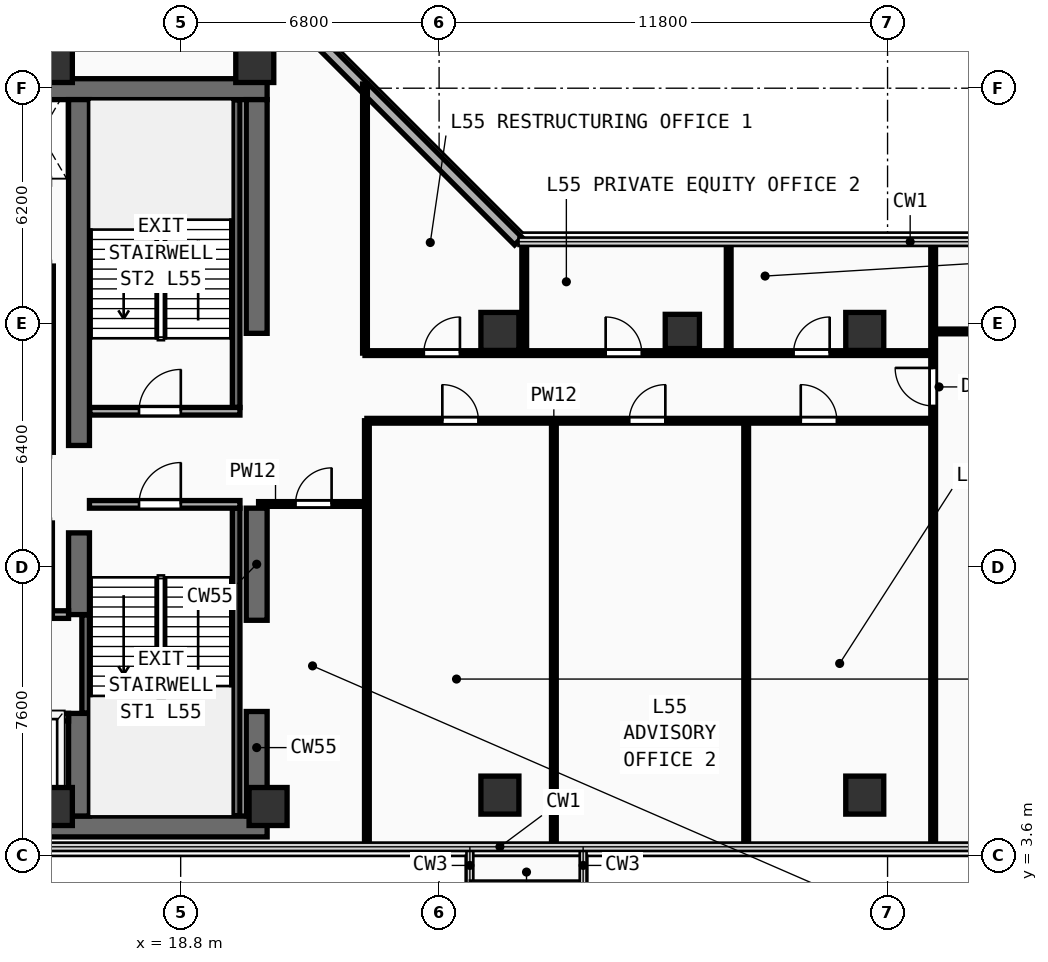
"""IFC4 building model, lengths in metres.
Left out: names, types, materials, properties, quantities, classifications, styles, units other than length and angle.
Written with IfcOpenShell. Run it as: python <this file> out.ifc"""

import sys

from ifc_helpers import new_model, si_unit, direction, frame, frame_2d, origin, origin_2d, place, context, subcontext, project, spatial, rectangle, extrude, element, fill, save


model = new_model("IFC4")
c1 = context("Model", 3, precision=1e-05, world=origin(), true_north=direction((0.0, 1.0)))
c2 = subcontext(c1, "Body", "Model", "MODEL_VIEW")
j1 = project(units=[si_unit("LENGTHUNIT", "METRE"), si_unit("PLANEANGLEUNIT", "RADIAN")], contexts=[c1])
p1 = place(None, origin())
s1 = spatial("IfcSite", under=j1, at=p1, CompositionType="ELEMENT")
p2 = place(p1, origin())
s2 = spatial("IfcBuilding", under=s1, at=p2, CompositionType="ELEMENT")
p3 = place(p2, frame((0.0, 0.0, 215.9)))
s3 = spatial("IfcBuildingStorey", under=s2, at=p3, CompositionType="ELEMENT", Elevation=215.9)
for number, where, z_axis, x_axis in (
    (1, (7.175, 4.375, 0.0), (0.0, 0.0, 1.0), (1.0, 0.0, 0.0)),
    (2, (7.175, 23.775, 0.0), (0.0, 0.0, 1.0), (1.0, 0.0, 0.0)),
):
    element("IfcWall", number, at=place(p3, frame(where, z_axis=z_axis, x_axis=x_axis)), inside=s3, PredefinedType="SHEAR", context=c2, shape_type="SweptSolid", body=[
        extrude(rectangle(XDim=13.9, YDim=0.55, at=frame_2d((6.95, 0.0))), origin(), (0.0, 0.0, 1.0), 3.56),
    ])
p4 = place(p3, frame((20.8, 4.65, 0.0), z_axis=(0.0, 0.0, 1.0), x_axis=(0.0, 1.0, 0.0)))
e3 = element("IfcWall", 3, at=p4, inside=s3, PredefinedType="SHEAR", context=c2, shape_type="SweptSolid", body=[
    extrude(rectangle(XDim=2.75, YDim=0.55, at=frame_2d((1.375, 0.0))), origin(), (0.0, 0.0, 1.0), 3.56),
])
p5 = place(p3, frame((20.8, 9.8, 0.0), z_axis=(0.0, 0.0, 1.0), x_axis=(0.0, 1.0, 0.0)))
e4 = element("IfcWall", 4, at=p5, inside=s3, PredefinedType="SHEAR", context=c2, shape_type="SweptSolid", body=[
    extrude(rectangle(XDim=2.95, YDim=0.55, at=frame_2d((1.475, 0.0))), origin(), (0.0, 0.0, 1.0), 3.56),
])
p6 = place(p3, frame((20.8, 17.35, 0.0), z_axis=(0.0, 0.0, 1.0), x_axis=(0.0, 1.0, 0.0)))
e5 = element("IfcWall", 5, at=p6, inside=s3, PredefinedType="SHEAR", context=c2, shape_type="SweptSolid", body=[
    extrude(rectangle(XDim=6.15, YDim=0.55, at=frame_2d((3.075, 0.0))), origin(), (0.0, 0.0, 1.0), 3.56),
])
p7 = place(p3, frame((16.125, 4.65, 0.0), z_axis=(0.0, 0.0, 1.0), x_axis=(0.0, 1.0, 0.0)))
e6 = element("IfcWall", 6, at=p7, inside=s3, PredefinedType="SHEAR", context=c2, shape_type="SweptSolid", body=[
    extrude(rectangle(XDim=2.7, YDim=0.55, at=frame_2d((1.35, 0.0))), origin(), (0.0, 0.0, 1.0), 3.56),
])
p8 = place(p3, frame((16.125, 9.95, 0.0), z_axis=(0.0, 0.0, 1.0), x_axis=(0.0, 1.0, 0.0)))
e7 = element("IfcWall", 7, at=p8, inside=s3, PredefinedType="SHEAR", context=c2, shape_type="SweptSolid", body=[
    extrude(rectangle(XDim=2.15, YDim=0.55, at=frame_2d((1.075, 0.0))), origin(), (0.0, 0.0, 1.0), 3.56),
])
p9 = place(p3, frame((16.125, 14.4, 0.0), z_axis=(0.0, 0.0, 1.0), x_axis=(0.0, 1.0, 0.0)))
e8 = element("IfcWall", 8, at=p9, inside=s3, PredefinedType="SHEAR", context=c2, shape_type="SweptSolid", body=[
    extrude(rectangle(XDim=9.1, YDim=0.55, at=frame_2d((4.55, 0.0))), origin(), (0.0, 0.0, 1.0), 3.56),
])
for number, where, z_axis, x_axis in (
    (9, (15.45, 4.9, 0.0), (0.0, 0.0, 1.0), (1.0, 0.0, 0.0)),
    (10, (21.1, 4.9, 0.0), (0.0, 0.0, 1.0), (1.0, 0.0, 0.0)),
    (11, (15.45, 24.45, 0.0), (0.0, 0.0, 1.0), (1.0, 0.0, 0.0)),
    (12, (20.75, 24.45, 0.0), (0.0, 0.0, 1.0), (1.0, 0.0, 0.0)),
    (13, (27.2, 5.2, 0.0), (0.0, 0.0, 1.0), (1.0, 0.0, 0.0)),
    (14, (36.8, 5.2, 0.0), (0.0, 0.0, 1.0), (1.0, 0.0, 0.0)),
    (15, (27.2, 17.4, 0.0), (0.0, 0.0, 1.0), (1.0, 0.0, 0.0)),
    (16, (36.8, 17.4, 0.0), (0.0, 0.0, 1.0), (1.0, 0.0, 0.0)),
):
    element("IfcColumn", number, at=place(p3, frame(where, z_axis=z_axis, x_axis=x_axis)), inside=s3, PredefinedType="COLUMN", context=c2, shape_type="SweptSolid", body=[
        extrude(rectangle(XDim=1.0, YDim=1.0, at=origin_2d()), origin(), (0.0, 0.0, 1.0), 3.56),
    ])
p10 = place(p3, frame((32.0, 17.4, 0.0), z_axis=(0.0, 0.0, 1.0), x_axis=(1.0, 0.0, 0.0)))
e17 = element("IfcColumn", 17, at=p10, inside=s3, PredefinedType="COLUMN", context=c2, shape_type="SweptSolid", body=[
    extrude(rectangle(XDim=0.9, YDim=0.9, at=origin_2d()), origin(), (0.0, 0.0, 1.0), 3.56),
])
p11 = place(p3, frame((27.685, 19.775, 0.0), z_axis=(0.0, 0.0, 1.0), x_axis=(-0.707106781187, 0.707106781187, 0.0)))
e18 = element("IfcWall", 18, at=p11, inside=s3, PredefinedType="SOLIDWALL", context=c2, shape_type="SweptSolid", body=[
    extrude(rectangle(XDim=9.207, YDim=0.28, at=frame_2d((4.603, 0.0))), origin(), (0.0, 0.0, 1.0), 3.56),
])
p12 = place(p3, frame((16.3, 7.36, 0.0), z_axis=(0.0, 0.0, 1.0), x_axis=(0.0, 1.0, 0.0)))
e19 = element("IfcWall", 19, at=p12, inside=s3, PredefinedType="SHEAR", context=c2, shape_type="SweptSolid", body=[
    extrude(rectangle(XDim=2.58, YDim=0.2, at=frame_2d((1.29, 0.0))), origin(), (0.0, 0.0, 1.0), 3.56),
])
p13 = place(p3, frame((20.26, 4.66, 0.0), z_axis=(0.0, 0.0, 1.0), x_axis=(0.0, 1.0, 0.0)))
e20 = element("IfcWall", 20, at=p13, inside=s3, PredefinedType="SHEAR", context=c2, shape_type="SweptSolid", body=[
    extrude(rectangle(XDim=8.09, YDim=0.2, at=frame_2d((4.045, 0.0))), origin(), (0.0, 0.0, 1.0), 3.56),
])
p14 = place(p3, frame((16.4, 12.85, 0.0), z_axis=(0.0, 0.0, 1.0), x_axis=(1.0, 0.0, 0.0)))
e21 = element("IfcWall", 21, at=p14, inside=s3, PredefinedType="PARTITIONING", context=c2, shape_type="SweptSolid", body=[
    extrude(rectangle(XDim=3.96, YDim=0.2, at=frame_2d((1.98, 0.0))), origin(), (0.0, 0.0, 1.0), 3.56),
])
p15 = place(p14, frame((1.304, 0.0, 0.0)))
e22 = element("IfcOpeningElement", 22, at=p15, cuts=e21, PredefinedType="OPENING", context=c2, shape_type="SweptSolid", body=[
    extrude(rectangle(XDim=1.1, YDim=2.2, at=frame_2d((0.55, 1.1))), frame((0.0, 0.11, 0.0), z_axis=(0.0, -1.0, 0.0), x_axis=(1.0, 0.0, 0.0)), (0.0, 0.0, 1.0), 0.22),
])
p16 = place(p3, frame((20.26, 15.4, 0.0), z_axis=(0.0, 0.0, 1.0), x_axis=(0.0, 1.0, 0.0)))
e23 = element("IfcWall", 23, at=p16, inside=s3, PredefinedType="SHEAR", context=c2, shape_type="SweptSolid", body=[
    extrude(rectangle(XDim=8.09, YDim=0.2, at=frame_2d((4.045, 0.0))), origin(), (0.0, 0.0, 1.0), 3.56),
])
p17 = place(p3, frame((16.41, 15.3, 0.0), z_axis=(0.0, 0.0, 1.0), x_axis=(1.0, 0.0, 0.0)))
e24 = element("IfcWall", 24, at=p17, inside=s3, PredefinedType="PARTITIONING", context=c2, shape_type="SweptSolid", body=[
    extrude(rectangle(XDim=3.95, YDim=0.2, at=frame_2d((1.975, 0.0))), origin(), (0.0, 0.0, 1.0), 3.56),
])
p18 = place(p17, frame((1.294, 0.0, 0.0)))
e25 = element("IfcOpeningElement", 25, at=p18, cuts=e24, PredefinedType="OPENING", context=c2, shape_type="SweptSolid", body=[
    extrude(rectangle(XDim=1.1, YDim=2.2, at=frame_2d((0.55, 1.1))), frame((0.0, 0.11, 0.0), z_axis=(0.0, -1.0, 0.0), x_axis=(1.0, 0.0, 0.0)), (0.0, 0.0, 1.0), 0.22),
])
p19 = place(p3, frame((7.5, 7.25, 0.0), z_axis=(0.0, 0.0, 1.0), x_axis=(1.0, 0.0, 0.0)))
e26 = element("IfcWall", 26, at=p19, inside=s3, PredefinedType="PARTITIONING", context=c2, shape_type="SweptSolid", body=[
    extrude(rectangle(XDim=8.35, YDim=0.2, at=frame_2d((4.175, 0.0))), origin(), (0.0, 0.0, 1.0), 3.56),
])
p20 = place(p19, frame((0.53, 0.0, 0.0)))
e27 = element("IfcOpeningElement", 27, at=p20, cuts=e26, PredefinedType="OPENING", context=c2, shape_type="SweptSolid", body=[
    extrude(rectangle(XDim=1.1, YDim=2.2, at=frame_2d((0.55, 1.1))), frame((0.0, 0.11, 0.0), z_axis=(0.0, -1.0, 0.0), x_axis=(1.0, 0.0, 0.0)), (0.0, 0.0, 1.0), 0.22),
])
p21 = place(p19, frame((2.37, 0.0, 0.0)))
e28 = element("IfcOpeningElement", 28, at=p21, cuts=e26, PredefinedType="OPENING", context=c2, shape_type="SweptSolid", body=[
    extrude(rectangle(XDim=1.1, YDim=2.2, at=frame_2d((0.55, 1.1))), frame((0.0, 0.11, 0.0), z_axis=(0.0, -1.0, 0.0), x_axis=(1.0, 0.0, 0.0)), (0.0, 0.0, 1.0), 0.22),
])
p22 = place(p19, frame((4.33, 0.0, 0.0)))
e29 = element("IfcOpeningElement", 29, at=p22, cuts=e26, PredefinedType="OPENING", context=c2, shape_type="SweptSolid", body=[
    extrude(rectangle(XDim=1.1, YDim=2.2, at=frame_2d((0.55, 1.1))), frame((0.0, 0.11, 0.0), z_axis=(0.0, -1.0, 0.0), x_axis=(1.0, 0.0, 0.0)), (0.0, 0.0, 1.0), 0.22),
])
p23 = place(p19, frame((6.5, 0.0, 0.0)))
e30 = element("IfcOpeningElement", 30, at=p23, cuts=e26, PredefinedType="OPENING", context=c2, shape_type="SweptSolid", body=[
    extrude(rectangle(XDim=1.1, YDim=2.2, at=frame_2d((0.55, 1.1))), frame((0.0, 0.11, 0.0), z_axis=(0.0, -1.0, 0.0), x_axis=(1.0, 0.0, 0.0)), (0.0, 0.0, 1.0), 0.22),
])
p24 = place(p3, frame((7.5, 9.95, 0.0), z_axis=(0.0, 0.0, 1.0), x_axis=(1.0, 0.0, 0.0)))
e31 = element("IfcWall", 31, at=p24, inside=s3, PredefinedType="PARTITIONING", context=c2, shape_type="SweptSolid", body=[
    extrude(rectangle(XDim=8.35, YDim=0.2, at=frame_2d((4.175, 0.0))), origin(), (0.0, 0.0, 1.0), 3.56),
])
p25 = place(p3, frame((15.35, 9.95, 0.0), z_axis=(0.0, 0.0, 1.0), x_axis=(0.0, 1.0, 0.0)))
e32 = element("IfcWall", 32, at=p25, inside=s3, PredefinedType="PARTITIONING", context=c2, shape_type="SweptSolid", body=[
    extrude(rectangle(XDim=2.41, YDim=0.15, at=frame_2d((1.205, 0.0))), origin(), (0.0, 0.0, 1.0), 3.56),
])
p26 = place(p3, frame((15.35, 14.22, 0.0), z_axis=(0.0, 0.0, 1.0), x_axis=(0.0, 1.0, 0.0)))
e33 = element("IfcWall", 33, at=p26, inside=s3, PredefinedType="PARTITIONING", context=c2, shape_type="SweptSolid", body=[
    extrude(rectangle(XDim=2.23, YDim=0.2, at=frame_2d((1.115, 0.0))), origin(), (0.0, 0.0, 1.0), 3.56),
])
p27 = place(p3, frame((15.35, 16.45, 0.0), z_axis=(0.0, 0.0, 1.0), x_axis=(0.0, 1.0, 0.0)))
e34 = element("IfcWall", 34, at=p27, inside=s3, PredefinedType="PARTITIONING", context=c2, shape_type="SweptSolid", body=[
    extrude(rectangle(XDim=2.67, YDim=0.2, at=frame_2d((1.335, 0.0))), origin(), (0.0, 0.0, 1.0), 3.56),
])
p28 = place(p3, frame((20.85, 12.86, 0.0), z_axis=(0.0, 0.0, 1.0), x_axis=(1.0, 0.0, 0.0)))
e35 = element("IfcWall", 35, at=p28, inside=s3, PredefinedType="PARTITIONING", context=c2, shape_type="SweptSolid", body=[
    extrude(rectangle(XDim=2.85, YDim=0.125, at=frame_2d((1.425, 0.0))), origin(), (0.0, 0.0, 1.0), 3.56),
])
p29 = place(p28, frame((0.971, 0.0, 0.0)))
e36 = element("IfcOpeningElement", 36, at=p29, cuts=e35, PredefinedType="OPENING", context=c2, shape_type="SweptSolid", body=[
    extrude(rectangle(XDim=0.95, YDim=2.15, at=frame_2d((0.475, 1.075))), frame((0.0, 0.073, 0.0), z_axis=(0.0, -1.0, 0.0), x_axis=(1.0, 0.0, 0.0)), (0.0, 0.0, 1.0), 0.145),
])
p30 = place(p3, frame((23.7, 3.84, 0.0), z_axis=(0.0, 0.0, 1.0), x_axis=(0.0, 1.0, 0.0)))
e37 = element("IfcWall", 37, at=p30, inside=s3, PredefinedType="PARTITIONING", context=c2, shape_type="SweptSolid", body=[
    extrude(rectangle(XDim=11.21, YDim=0.125, at=frame_2d((5.605, 0.0))), origin(), (0.0, 0.0, 1.0), 3.56),
])
p31 = place(p3, frame((23.7, 15.05, 0.0), z_axis=(0.0, 0.0, 1.0), x_axis=(1.0, 0.0, 0.0)))
e38 = element("IfcWall", 38, at=p31, inside=s3, PredefinedType="PARTITIONING", context=c2, shape_type="SweptSolid", body=[
    extrude(rectangle(XDim=14.9, YDim=0.125, at=frame_2d((7.45, 0.0))), origin(), (0.0, 0.0, 1.0), 3.56),
])
p32 = place(p31, frame((1.985, 0.0, 0.0)))
e39 = element("IfcOpeningElement", 39, at=p32, cuts=e38, PredefinedType="OPENING", context=c2, shape_type="SweptSolid", body=[
    extrude(rectangle(XDim=0.95, YDim=2.15, at=frame_2d((0.475, 1.075))), frame((0.0, 0.073, 0.0), z_axis=(0.0, -1.0, 0.0), x_axis=(1.0, 0.0, 0.0)), (0.0, 0.0, 1.0), 0.145),
])
p33 = place(p31, frame((6.903, 0.0, 0.0)))
e40 = element("IfcOpeningElement", 40, at=p33, cuts=e38, PredefinedType="OPENING", context=c2, shape_type="SweptSolid", body=[
    extrude(rectangle(XDim=0.95, YDim=2.15, at=frame_2d((0.475, 1.075))), frame((0.0, 0.073, 0.0), z_axis=(0.0, -1.0, 0.0), x_axis=(1.0, 0.0, 0.0)), (0.0, 0.0, 1.0), 0.145),
])
p34 = place(p31, frame((11.416, 0.0, 0.0)))
e41 = element("IfcOpeningElement", 41, at=p34, cuts=e38, PredefinedType="OPENING", context=c2, shape_type="SweptSolid", body=[
    extrude(rectangle(XDim=0.95, YDim=2.15, at=frame_2d((0.475, 1.075))), frame((0.0, 0.073, 0.0), z_axis=(0.0, -1.0, 0.0), x_axis=(1.0, 0.0, 0.0)), (0.0, 0.0, 1.0), 0.145),
])
for number, where, z_axis, x_axis in (
    (42, (28.62, 3.84, 0.0), (0.0, 0.0, 1.0), (0.0, 1.0, 0.0)),
    (43, (33.68, 3.84, 0.0), (0.0, 0.0, 1.0), (0.0, 1.0, 0.0)),
):
    element("IfcWall", number, at=place(p3, frame(where, z_axis=z_axis, x_axis=x_axis)), inside=s3, PredefinedType="PARTITIONING", context=c2, shape_type="SweptSolid", body=[
        extrude(rectangle(XDim=11.21, YDim=0.125, at=frame_2d((5.605, 0.0))), origin(), (0.0, 0.0, 1.0), 3.56),
    ])
p35 = place(p3, frame((38.6, 3.84, 0.0), z_axis=(0.0, 0.0, 1.0), x_axis=(0.0, 1.0, 0.0)))
e44 = element("IfcWall", 44, at=p35, inside=s3, PredefinedType="PARTITIONING", context=c2, shape_type="SweptSolid", body=[
    extrude(rectangle(XDim=15.92, YDim=0.125, at=frame_2d((7.96, 0.0))), origin(), (0.0, 0.0, 1.0), 3.56),
])
p36 = place(p35, frame((11.6, 0.0, 0.0)))
e45 = element("IfcOpeningElement", 45, at=p36, cuts=e44, PredefinedType="OPENING", context=c2, shape_type="SweptSolid", body=[
    extrude(rectangle(XDim=1.0, YDim=2.2, at=frame_2d((0.5, 1.1))), frame((0.0, 0.073, 0.0), z_axis=(0.0, -1.0, 0.0), x_axis=(1.0, 0.0, 0.0)), (0.0, 0.0, 1.0), 0.145),
])
p37 = place(p3, frame((38.6, 17.4, 0.0), z_axis=(0.0, 0.0, 1.0), x_axis=(1.0, 0.0, 0.0)))
e46 = element("IfcWall", 46, at=p37, inside=s3, PredefinedType="PARTITIONING", context=c2, shape_type="SweptSolid", body=[
    extrude(rectangle(XDim=12.56, YDim=0.125, at=frame_2d((6.28, 0.0))), origin(), (0.0, 0.0, 1.0), 3.26),
])
p38 = place(p37, frame((3.525, 0.0, 0.0)))
e47 = element("IfcOpeningElement", 47, at=p38, cuts=e46, PredefinedType="OPENING", context=c2, shape_type="SweptSolid", body=[
    extrude(rectangle(XDim=0.95, YDim=2.15, at=frame_2d((0.475, 1.075))), frame((0.0, 0.073, 0.0), z_axis=(0.0, -1.0, 0.0), x_axis=(1.0, 0.0, 0.0)), (0.0, 0.0, 1.0), 0.145),
])
p39 = place(p3, frame((23.65, 16.83, 0.0), z_axis=(0.0, 0.0, 1.0), x_axis=(0.0, 1.0, 0.0)))
e48 = element("IfcWall", 48, at=p39, inside=s3, PredefinedType="PARTITIONING", context=c2, shape_type="SweptSolid", body=[
    extrude(rectangle(XDim=7.08, YDim=0.125, at=frame_2d((3.54, 0.0))), origin(), (0.0, 0.0, 1.0), 3.56),
])
p40 = place(p3, frame((23.65, 16.83, 0.0), z_axis=(0.0, 0.0, 1.0), x_axis=(1.0, 0.0, 0.0)))
e49 = element("IfcWall", 49, at=p40, inside=s3, PredefinedType="PARTITIONING", context=c2, shape_type="SweptSolid", body=[
    extrude(rectangle(XDim=14.95, YDim=0.125, at=frame_2d((7.475, 0.0))), origin(), (0.0, 0.0, 1.0), 3.56),
])
p41 = place(p40, frame((1.548, 0.0, 0.0)))
e50 = element("IfcOpeningElement", 50, at=p41, cuts=e49, PredefinedType="OPENING", context=c2, shape_type="SweptSolid", body=[
    extrude(rectangle(XDim=0.95, YDim=2.15, at=frame_2d((0.475, 1.075))), frame((0.0, 0.073, 0.0), z_axis=(0.0, -1.0, 0.0), x_axis=(1.0, 0.0, 0.0)), (0.0, 0.0, 1.0), 0.145),
])
p42 = place(p40, frame((6.333, 0.0, 0.0)))
e51 = element("IfcOpeningElement", 51, at=p42, cuts=e49, PredefinedType="OPENING", context=c2, shape_type="SweptSolid", body=[
    extrude(rectangle(XDim=0.95, YDim=2.15, at=frame_2d((0.475, 1.075))), frame((0.0, 0.073, 0.0), z_axis=(0.0, -1.0, 0.0), x_axis=(1.0, 0.0, 0.0)), (0.0, 0.0, 1.0), 0.145),
])
p43 = place(p40, frame((11.277, 0.0, 0.0)))
e52 = element("IfcOpeningElement", 52, at=p43, cuts=e49, PredefinedType="OPENING", context=c2, shape_type="SweptSolid", body=[
    extrude(rectangle(XDim=0.95, YDim=2.15, at=frame_2d((0.475, 1.075))), frame((0.0, 0.073, 0.0), z_axis=(0.0, -1.0, 0.0), x_axis=(1.0, 0.0, 0.0)), (0.0, 0.0, 1.0), 0.145),
])
for number, where, z_axis, x_axis in (
    (53, (27.84, 16.83, 0.0), (0.0, 0.0, 1.0), (0.0, 1.0, 0.0)),
    (54, (33.22, 16.83, 0.0), (0.0, 0.0, 1.0), (0.0, 1.0, 0.0)),
):
    element("IfcWall", number, at=place(p3, frame(where, z_axis=z_axis, x_axis=x_axis)), inside=s3, PredefinedType="PARTITIONING", context=c2, shape_type="SweptSolid", body=[
        extrude(rectangle(XDim=2.93, YDim=0.125, at=frame_2d((1.465, 0.0))), origin(), (0.0, 0.0, 1.0), 3.56),
    ])
p44 = place(p15, frame((1.1, 0.0, 0.0), z_axis=(0.0, 0.0, 1.0), x_axis=(-1.0, 0.0, 0.0)))
e55 = element("IfcDoor", 55, at=p44, inside=s3, OperationType="SINGLE_SWING_LEFT", PredefinedType="DOOR", context=c2, shape_type="SweptSolid", body=[
    extrude(rectangle(XDim=1.1, YDim=2.2, at=frame_2d((0.55, 1.1))), frame((0.0, 0.025, 0.0), z_axis=(0.0, -1.0, 0.0), x_axis=(1.0, 0.0, 0.0)), (0.0, 0.0, 1.0), 0.05),
])
fill(e22, e55)
p45 = place(p18, origin())
e56 = element("IfcDoor", 56, at=p45, inside=s3, OperationType="SINGLE_SWING_RIGHT", PredefinedType="DOOR", context=c2, shape_type="SweptSolid", body=[
    extrude(rectangle(XDim=1.1, YDim=2.2, at=frame_2d((0.55, 1.1))), frame((0.0, 0.025, 0.0), z_axis=(0.0, -1.0, 0.0), x_axis=(1.0, 0.0, 0.0)), (0.0, 0.0, 1.0), 0.05),
])
fill(e25, e56)
p46 = place(p29, origin())
e57 = element("IfcDoor", 57, at=p46, inside=s3, OperationType="SINGLE_SWING_RIGHT", PredefinedType="DOOR", context=c2, shape_type="SweptSolid", body=[
    extrude(rectangle(XDim=0.95, YDim=2.15, at=frame_2d((0.475, 1.075))), frame((0.0, 0.025, 0.0), z_axis=(0.0, -1.0, 0.0), x_axis=(1.0, 0.0, 0.0)), (0.0, 0.0, 1.0), 0.05),
])
fill(e36, e57)
p47 = place(p32, origin())
e58 = element("IfcDoor", 58, at=p47, inside=s3, OperationType="SINGLE_SWING_LEFT", PredefinedType="DOOR", context=c2, shape_type="SweptSolid", body=[
    extrude(rectangle(XDim=0.95, YDim=2.15, at=frame_2d((0.475, 1.075))), frame((0.0, 0.025, 0.0), z_axis=(0.0, -1.0, 0.0), x_axis=(1.0, 0.0, 0.0)), (0.0, 0.0, 1.0), 0.05),
])
fill(e39, e58)
p48 = place(p33, origin())
e59 = element("IfcDoor", 59, at=p48, inside=s3, OperationType="SINGLE_SWING_RIGHT", PredefinedType="DOOR", context=c2, shape_type="SweptSolid", body=[
    extrude(rectangle(XDim=0.95, YDim=2.15, at=frame_2d((0.475, 1.075))), frame((0.0, 0.025, 0.0), z_axis=(0.0, -1.0, 0.0), x_axis=(1.0, 0.0, 0.0)), (0.0, 0.0, 1.0), 0.05),
])
fill(e40, e59)
p49 = place(p34, origin())
e60 = element("IfcDoor", 60, at=p49, inside=s3, OperationType="SINGLE_SWING_LEFT", PredefinedType="DOOR", context=c2, shape_type="SweptSolid", body=[
    extrude(rectangle(XDim=0.95, YDim=2.15, at=frame_2d((0.475, 1.075))), frame((0.0, 0.025, 0.0), z_axis=(0.0, -1.0, 0.0), x_axis=(1.0, 0.0, 0.0)), (0.0, 0.0, 1.0), 0.05),
])
fill(e41, e60)
p50 = place(p36, origin())
e61 = element("IfcDoor", 61, at=p50, inside=s3, OperationType="SINGLE_SWING_RIGHT", PredefinedType="DOOR", context=c2, shape_type="SweptSolid", body=[
    extrude(rectangle(XDim=1.0, YDim=2.2, at=frame_2d((0.5, 1.1))), frame((0.0, 0.025, 0.0), z_axis=(0.0, -1.0, 0.0), x_axis=(1.0, 0.0, 0.0)), (0.0, 0.0, 1.0), 0.05),
])
fill(e45, e61)
p51 = place(p41, origin())
e62 = element("IfcDoor", 62, at=p51, inside=s3, OperationType="SINGLE_SWING_RIGHT", PredefinedType="DOOR", context=c2, shape_type="SweptSolid", body=[
    extrude(rectangle(XDim=0.95, YDim=2.15, at=frame_2d((0.475, 1.075))), frame((0.0, 0.025, 0.0), z_axis=(0.0, -1.0, 0.0), x_axis=(1.0, 0.0, 0.0)), (0.0, 0.0, 1.0), 0.05),
])
fill(e50, e62)
p52 = place(p42, origin())
e63 = element("IfcDoor", 63, at=p52, inside=s3, OperationType="SINGLE_SWING_LEFT", PredefinedType="DOOR", context=c2, shape_type="SweptSolid", body=[
    extrude(rectangle(XDim=0.95, YDim=2.15, at=frame_2d((0.475, 1.075))), frame((0.0, 0.025, 0.0), z_axis=(0.0, -1.0, 0.0), x_axis=(1.0, 0.0, 0.0)), (0.0, 0.0, 1.0), 0.05),
])
fill(e51, e63)
p53 = place(p43, origin())
e64 = element("IfcDoor", 64, at=p53, inside=s3, OperationType="SINGLE_SWING_RIGHT", PredefinedType="DOOR", context=c2, shape_type="SweptSolid", body=[
    extrude(rectangle(XDim=0.95, YDim=2.15, at=frame_2d((0.475, 1.075))), frame((0.0, 0.025, 0.0), z_axis=(0.0, -1.0, 0.0), x_axis=(1.0, 0.0, 0.0)), (0.0, 0.0, 1.0), 0.05),
])
fill(e52, e64)
save(model, sys.argv[1])
